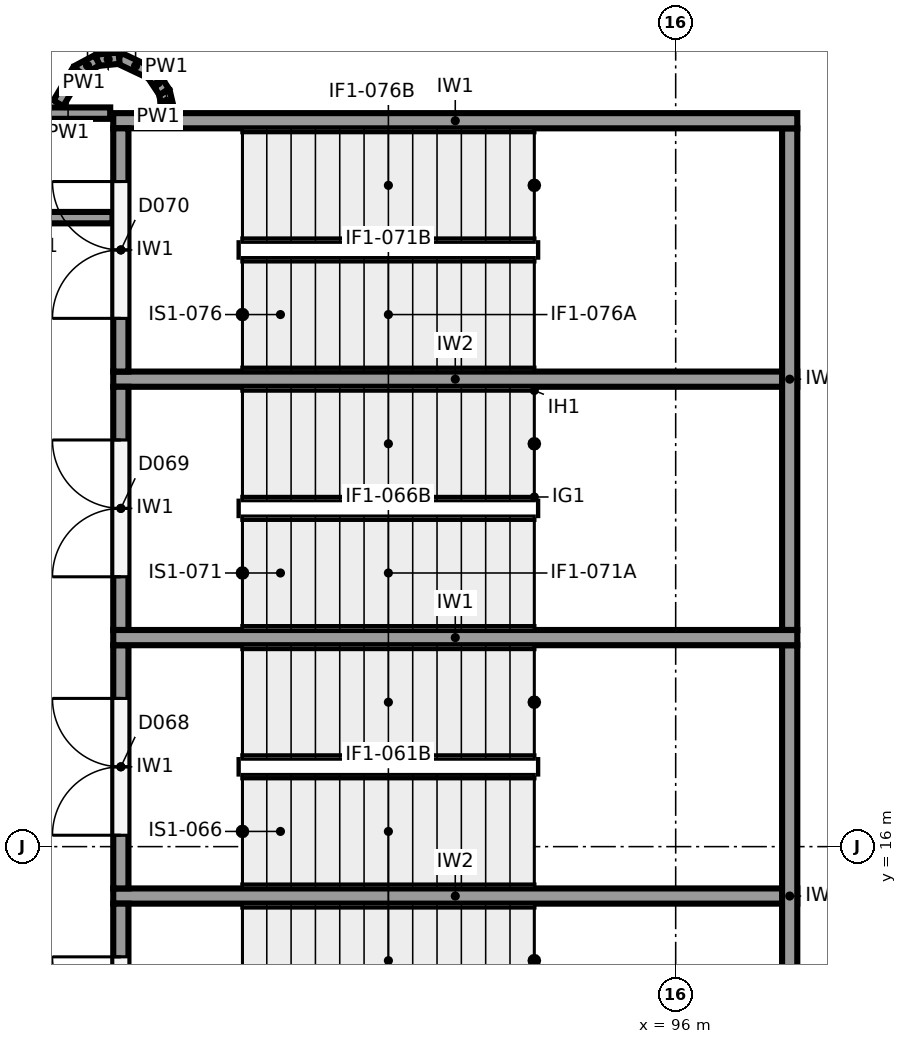
"""IFC4 building model, lengths in metres.
Left out: names, types, materials, properties, quantities, classifications, styles, units other than length and angle.
Written with IfcOpenShell. Run it as: python <this file> out.ifc"""

import sys

from ifc_helpers import new_model, si_unit, direction, frame, frame_2d, origin, place, context, subcontext, project, spatial, rectangle, extrude, element, fill, save


model = new_model("IFC4")
c1 = context("Model", 3, precision=1e-05, world=origin(), true_north=direction((0.0, 1.0)))
c2 = subcontext(c1, "Body", "Model", "MODEL_VIEW")
j1 = project(units=[si_unit("LENGTHUNIT", "METRE"), si_unit("PLANEANGLEUNIT", "RADIAN")], contexts=[c1])
p1 = place(None, origin())
s1 = spatial("IfcSite", under=j1, at=p1, CompositionType="ELEMENT")
p2 = place(p1, origin())
s2 = spatial("IfcBuilding", under=s1, at=p2, CompositionType="ELEMENT")
p3 = place(p2, frame((0.0, 0.0, -4.0)))
s3 = spatial("IfcBuildingStorey", under=s2, at=p3, CompositionType="ELEMENT", Elevation=-4.0)
for number, where, z_axis, x_axis in (
    (1, (97.6, 18.75, -1.2), (0.0, 0.0, 1.0), (-1.0, 0.0, 0.0)),
    (2, (97.6, 25.55, -1.2), (0.0, 0.0, 1.0), (-1.0, 0.0, 0.0)),
):
    element("IfcWall", number, at=place(p3, frame(where, z_axis=z_axis, x_axis=x_axis)), inside=s3, PredefinedType="SHEAR", context=c2, shape_type="SweptSolid", body=[
        extrude(rectangle(XDim=9.0, YDim=0.2, at=frame_2d((4.5, 0.0))), origin(), (0.0, 0.0, 1.0), 4.8),
    ])
for number, where, z_axis, x_axis in (
    (3, (97.5, 12.05, -1.2), (0.0, 0.0, 1.0), (0.0, 1.0, 0.0)),
    (4, (97.5, 18.85, -1.2), (0.0, 0.0, 1.0), (0.0, 1.0, 0.0)),
):
    element("IfcWall", number, at=place(p3, frame(where, z_axis=z_axis, x_axis=x_axis)), inside=s3, PredefinedType="SHEAR", context=c2, shape_type="SweptSolid", body=[
        extrude(rectangle(XDim=6.6, YDim=0.2, at=frame_2d((3.3, 0.0))), origin(), (0.0, 0.0, 1.0), 4.8),
    ])
for number, where, z_axis, x_axis in (
    (5, (97.6, 15.35, -1.2), (0.0, 0.0, 1.0), (-1.0, 0.0, 0.0)),
    (6, (97.6, 22.15, -1.2), (0.0, 0.0, 1.0), (-1.0, 0.0, 0.0)),
):
    element("IfcWall", number, at=place(p3, frame(where, z_axis=z_axis, x_axis=x_axis)), inside=s3, PredefinedType="SHEAR", context=c2, shape_type="SweptSolid", body=[
        extrude(rectangle(XDim=9.0, YDim=0.2, at=frame_2d((4.5, 0.0))), origin(), (0.0, 0.0, 1.0), 4.8),
    ])
p4 = place(p3, frame((88.7, 12.05, -1.2), z_axis=(0.0, 0.0, 1.0), x_axis=(0.0, 1.0, 0.0)))
e7 = element("IfcWall", 7, at=p4, inside=s3, PredefinedType="SHEAR", context=c2, shape_type="SweptSolid", body=[
    extrude(rectangle(XDim=3.2, YDim=0.2, at=frame_2d((1.6, 0.0))), origin(), (0.0, 0.0, 1.0), 4.8),
])
p5 = place(p4, frame((0.7, 0.0, 1.2)))
e8 = element("IfcOpeningElement", 8, at=p5, cuts=e7, PredefinedType="OPENING", context=c2, shape_type="SweptSolid", body=[
    extrude(rectangle(XDim=1.8, YDim=2.1, at=frame_2d((0.9, 1.05))), frame((0.0, 0.11, 0.0), z_axis=(0.0, -1.0, 0.0), x_axis=(1.0, 0.0, 0.0)), (0.0, 0.0, 1.0), 0.22),
])
p6 = place(p3, frame((88.7, 15.45, -1.2), z_axis=(0.0, 0.0, 1.0), x_axis=(0.0, 1.0, 0.0)))
e9 = element("IfcWall", 9, at=p6, inside=s3, PredefinedType="SHEAR", context=c2, shape_type="SweptSolid", body=[
    extrude(rectangle(XDim=3.2, YDim=0.2, at=frame_2d((1.6, 0.0))), origin(), (0.0, 0.0, 1.0), 4.8),
])
p7 = place(p6, frame((0.7, 0.0, 1.2)))
e10 = element("IfcOpeningElement", 10, at=p7, cuts=e9, PredefinedType="OPENING", context=c2, shape_type="SweptSolid", body=[
    extrude(rectangle(XDim=1.8, YDim=2.1, at=frame_2d((0.9, 1.05))), frame((0.0, 0.11, 0.0), z_axis=(0.0, -1.0, 0.0), x_axis=(1.0, 0.0, 0.0)), (0.0, 0.0, 1.0), 0.22),
])
p8 = place(p3, frame((88.7, 18.85, -1.2), z_axis=(0.0, 0.0, 1.0), x_axis=(0.0, 1.0, 0.0)))
e11 = element("IfcWall", 11, at=p8, inside=s3, PredefinedType="SHEAR", context=c2, shape_type="SweptSolid", body=[
    extrude(rectangle(XDim=3.2, YDim=0.2, at=frame_2d((1.6, 0.0))), origin(), (0.0, 0.0, 1.0), 4.8),
])
p9 = place(p8, frame((0.7, 0.0, 1.2)))
e12 = element("IfcOpeningElement", 12, at=p9, cuts=e11, PredefinedType="OPENING", context=c2, shape_type="SweptSolid", body=[
    extrude(rectangle(XDim=1.8, YDim=2.1, at=frame_2d((0.9, 1.05))), frame((0.0, 0.11, 0.0), z_axis=(0.0, -1.0, 0.0), x_axis=(1.0, 0.0, 0.0)), (0.0, 0.0, 1.0), 0.22),
])
p10 = place(p3, frame((88.7, 22.25, -1.2), z_axis=(0.0, 0.0, 1.0), x_axis=(0.0, 1.0, 0.0)))
e13 = element("IfcWall", 13, at=p10, inside=s3, PredefinedType="SHEAR", context=c2, shape_type="SweptSolid", body=[
    extrude(rectangle(XDim=3.2, YDim=0.2, at=frame_2d((1.6, 0.0))), origin(), (0.0, 0.0, 1.0), 4.8),
])
p11 = place(p10, frame((0.7, 0.0, 1.2)))
e14 = element("IfcOpeningElement", 14, at=p11, cuts=e13, PredefinedType="OPENING", context=c2, shape_type="SweptSolid", body=[
    extrude(rectangle(XDim=1.8, YDim=2.1, at=frame_2d((0.9, 1.05))), frame((0.0, 0.11, 0.0), z_axis=(0.0, -1.0, 0.0), x_axis=(1.0, 0.0, 0.0)), (0.0, 0.0, 1.0), 0.22),
])
p12 = place(p3, frame((88.56, 25.65, 0.0), z_axis=(0.0, 0.0, 1.0), x_axis=(-1.0, 0.0, 0.0)))
e15 = element("IfcWall", 15, at=p12, inside=s3, PredefinedType="PARTITIONING", context=c2, shape_type="SweptSolid", body=[
    extrude(rectangle(XDim=2.983, YDim=0.15, at=frame_2d((1.491, 0.0))), origin(), (0.0, 0.0, 1.0), 3.6),
])
p13 = place(p12, frame((0.95, 0.0, 0.0)))
e16 = element("IfcOpeningElement", 16, at=p13, cuts=e15, PredefinedType="OPENING", context=c2, shape_type="SweptSolid", body=[
    extrude(rectangle(XDim=1.0, YDim=2.1, at=frame_2d((0.5, 1.05))), frame((0.0, 0.085, 0.0), z_axis=(0.0, -1.0, 0.0), x_axis=(1.0, 0.0, 0.0)), (0.0, 0.0, 1.0), 0.17),
])
p14 = place(p3, frame((88.59, 24.275, 0.0), z_axis=(0.0, 0.0, 1.0), x_axis=(-1.0, 0.0, 0.0)))
e17 = element("IfcWall", 17, at=p14, inside=s3, PredefinedType="PARTITIONING", context=c2, shape_type="SweptSolid", body=[
    extrude(rectangle(XDim=2.465, YDim=0.15, at=frame_2d((1.232, 0.0))), origin(), (0.0, 0.0, 1.0), 3.6),
])
p15 = place(p3, frame((89.33, 25.678, 0.0), z_axis=(0.0, 0.0, 1.0), x_axis=(-0.230253879357, 0.973130593004, 0.0)))
e18 = element("IfcWall", 18, at=p15, inside=s3, PredefinedType="PARTITIONING", context=c2, shape_type="SweptSolid", body=[
    extrude(rectangle(XDim=0.258, YDim=0.15, at=frame_2d((0.129, 0.0))), origin(), (0.0, 0.0, 1.0), 3.6),
])
p16 = place(p3, frame((89.271, 25.929, 0.0), z_axis=(0.0, 0.0, 1.0), x_axis=(-0.555678694372, 0.831397130511, 0.0)))
e19 = element("IfcWall", 19, at=p16, inside=s3, PredefinedType="PARTITIONING", context=c2, shape_type="SweptSolid", body=[
    extrude(rectangle(XDim=0.288, YDim=0.15, at=frame_2d((0.144, 0.0))), origin(), (0.0, 0.0, 1.0), 3.6),
])
p17 = place(p3, frame((89.111, 26.168, 0.0), z_axis=(0.0, 0.0, 1.0), x_axis=(-0.90398642908, 0.427561148889, 0.0)))
e20 = element("IfcWall", 20, at=p17, inside=s3, PredefinedType="PARTITIONING", context=c2, shape_type="SweptSolid", body=[
    extrude(rectangle(XDim=0.48, YDim=0.15, at=frame_2d((0.24, 0.0))), origin(), (0.0, 0.0, 1.0), 3.6),
])
for number, where, z_axis, x_axis in (
    (21, (88.677, 26.374, 0.0), (0.0, 0.0, 1.0), (-0.995, -0.098, 0.0)),
    (22, (88.389, 26.345, 0.0), (0.0, 0.0, 1.0), (-0.882, -0.472, 0.0)),
):
    element("IfcWall", number, at=place(p3, frame(where, z_axis=z_axis, x_axis=x_axis)), inside=s3, PredefinedType="PARTITIONING", context=c2, shape_type="SweptSolid", body=[
        extrude(rectangle(XDim=0.289, YDim=0.15, at=frame_2d((0.145, 0.0))), origin(), (0.0, 0.0, 1.0), 3.6),
    ])
p18 = place(p3, frame((88.134, 26.209, 0.0), z_axis=(0.0, 0.0, 1.0), x_axis=(-0.513060623194, -0.858352373404, 0.0)))
e23 = element("IfcWall", 23, at=p18, inside=s3, PredefinedType="PARTITIONING", context=c2, shape_type="SweptSolid", body=[
    extrude(rectangle(XDim=0.5, YDim=0.15, at=frame_2d((0.25, 0.0))), origin(), (0.0, 0.0, 1.0), 3.6),
])
p19 = place(p5, origin())
e24 = element("IfcDoor", 24, at=p19, inside=s3, OperationType="DOUBLE_DOOR_SINGLE_SWING", PredefinedType="DOOR", context=c2, shape_type="SweptSolid", body=[
    extrude(rectangle(XDim=1.8, YDim=2.1, at=frame_2d((0.9, 1.05))), frame((0.0, 0.025, 0.0), z_axis=(0.0, -1.0, 0.0), x_axis=(1.0, 0.0, 0.0)), (0.0, 0.0, 1.0), 0.05),
])
fill(e8, e24)
p20 = place(p7, origin())
e25 = element("IfcDoor", 25, at=p20, inside=s3, OperationType="DOUBLE_DOOR_SINGLE_SWING", PredefinedType="DOOR", context=c2, shape_type="SweptSolid", body=[
    extrude(rectangle(XDim=1.8, YDim=2.1, at=frame_2d((0.9, 1.05))), frame((0.0, 0.025, 0.0), z_axis=(0.0, -1.0, 0.0), x_axis=(1.0, 0.0, 0.0)), (0.0, 0.0, 1.0), 0.05),
])
fill(e10, e25)
p21 = place(p9, origin())
e26 = element("IfcDoor", 26, at=p21, inside=s3, OperationType="DOUBLE_DOOR_SINGLE_SWING", PredefinedType="DOOR", context=c2, shape_type="SweptSolid", body=[
    extrude(rectangle(XDim=1.8, YDim=2.1, at=frame_2d((0.9, 1.05))), frame((0.0, 0.025, 0.0), z_axis=(0.0, -1.0, 0.0), x_axis=(1.0, 0.0, 0.0)), (0.0, 0.0, 1.0), 0.05),
])
fill(e12, e26)
p22 = place(p11, origin())
e27 = element("IfcDoor", 27, at=p22, inside=s3, OperationType="DOUBLE_DOOR_SINGLE_SWING", PredefinedType="DOOR", context=c2, shape_type="SweptSolid", body=[
    extrude(rectangle(XDim=1.8, YDim=2.1, at=frame_2d((0.9, 1.05))), frame((0.0, 0.025, 0.0), z_axis=(0.0, -1.0, 0.0), x_axis=(1.0, 0.0, 0.0)), (0.0, 0.0, 1.0), 0.05),
])
fill(e14, e27)
save(model, sys.argv[1])
